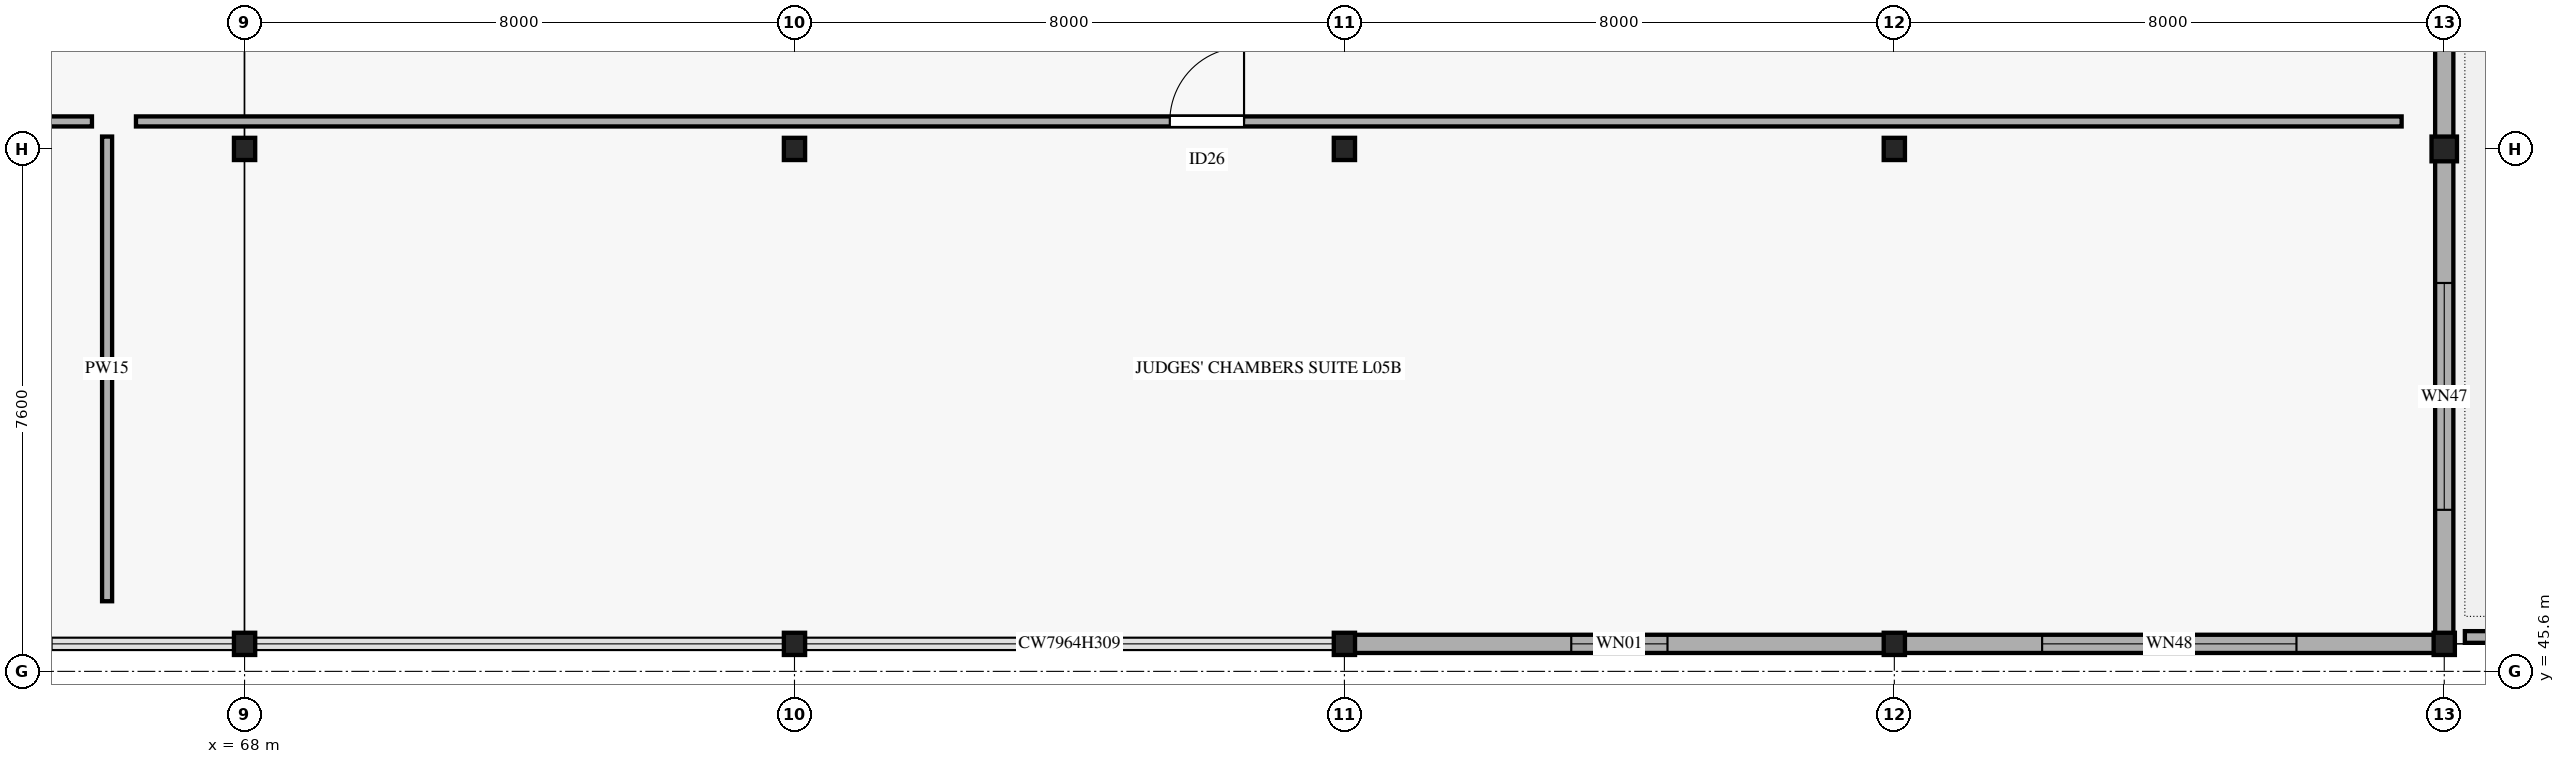
"""IFC4 building model, lengths in metres.
Left out: names, types, materials, properties, quantities, classifications, styles, units other than length and angle.
Written with IfcOpenShell. Run it as: python <this file> out.ifc"""

import sys

from ifc_helpers import new_model, si_unit, direction, frame, frame_2d, origin, origin_2d, place, context, subcontext, project, spatial, rectangle, i_section, extrude, element, fill, save


model = new_model("IFC4")
c1 = context("Model", 3, precision=1e-05, world=origin(), true_north=direction((0.0, 1.0)))
c2 = subcontext(c1, "Body", "Model", "MODEL_VIEW")
j1 = project(units=[si_unit("LENGTHUNIT", "METRE"), si_unit("PLANEANGLEUNIT", "RADIAN")], contexts=[c1])
p1 = place(None, origin())
s1 = spatial("IfcSite", under=j1, at=p1, CompositionType="ELEMENT")
p2 = place(p1, origin())
s2 = spatial("IfcBuilding", under=s1, at=p2, CompositionType="ELEMENT")
p3 = place(p2, frame((0.0, 0.0, 25.2)))
s3 = spatial("IfcBuildingStorey", under=s2, at=p3, CompositionType="ELEMENT", Elevation=25.2)
for number, where, z_axis, x_axis in (
    (1, (68.0, 46.0, 0.0), (0.0, 0.0, 1.0), (1.0, 0.0, 0.0)),
    (2, (68.0, 53.2, 0.0), (0.0, 0.0, 1.0), (1.0, 0.0, 0.0)),
    (3, (76.0, 46.0, 0.0), (0.0, 0.0, 1.0), (1.0, 0.0, 0.0)),
    (4, (76.0, 53.2, 0.0), (0.0, 0.0, 1.0), (1.0, 0.0, 0.0)),
    (5, (84.0, 46.0, 0.0), (0.0, 0.0, 1.0), (1.0, 0.0, 0.0)),
    (6, (84.0, 53.2, 0.0), (0.0, 0.0, 1.0), (1.0, 0.0, 0.0)),
    (7, (92.0, 46.0, 0.0), (0.0, 0.0, 1.0), (1.0, 0.0, 0.0)),
    (8, (92.0, 53.2, 0.0), (0.0, 0.0, 1.0), (1.0, 0.0, 0.0)),
    (9, (100.0, 46.0, 0.0), (0.0, 0.0, 1.0), (1.0, 0.0, 0.0)),
):
    element("IfcColumn", number, at=place(p3, frame(where, z_axis=z_axis, x_axis=x_axis)), inside=s3, PredefinedType="COLUMN", context=c2, shape_type="SweptSolid", body=[
        extrude(i_section(OverallWidth=0.309, OverallDepth=0.323, WebThickness=0.014, FlangeThickness=0.023, FilletRadius=0.015, at=origin_2d()), origin(), (0.0, 0.0, 1.0), 3.995),
    ])
p4 = place(p3, frame((100.0, 53.2, 0.0), z_axis=(0.0, 0.0, 1.0), x_axis=(1.0, 0.0, 0.0)))
e10 = element("IfcColumn", 10, at=p4, inside=s3, PredefinedType="COLUMN", context=c2, shape_type="SweptSolid", body=[
    extrude(i_section(OverallWidth=0.37, OverallDepth=0.36, WebThickness=0.012, FlangeThickness=0.02, FilletRadius=0.015, at=origin_2d()), origin(), (0.0, 0.0, 1.0), 3.995),
])
p5 = place(p3, frame((100.0, 60.82, 0.0), z_axis=(0.0, 0.0, 1.0), x_axis=(0.0, -1.0, 0.0)))
e11 = element("IfcWall", 11, at=p5, inside=s3, PredefinedType="STANDARD", context=c2, shape_type="SweptSolid", body=[
    extrude(rectangle(XDim=7.64, YDim=0.265, at=frame_2d((3.82, 0.0))), origin(), (0.0, 0.0, 1.0), 3.06),
])
p6 = place(p5, frame((2.37, 0.0, 0.75)))
e12 = element("IfcOpeningElement", 12, at=p6, cuts=e11, PredefinedType="OPENING", context=c2, shape_type="SweptSolid", body=[
    extrude(rectangle(XDim=2.9, YDim=1.65, at=frame_2d((1.45, 0.825))), frame((0.0, 0.142, 0.0), z_axis=(0.0, -1.0, 0.0), x_axis=(1.0, 0.0, 0.0)), (0.0, 0.0, 1.0), 0.285),
])
p7 = place(p3, frame((100.0, 53.22, 0.0), z_axis=(0.0, 0.0, 1.0), x_axis=(0.0, -1.0, 0.0)))
e13 = element("IfcWall", 13, at=p7, inside=s3, PredefinedType="STANDARD", context=c2, shape_type="SweptSolid", body=[
    extrude(rectangle(XDim=7.24, YDim=0.265, at=frame_2d((3.62, 0.0))), origin(), (0.0, 0.0, 1.0), 3.06),
])
p8 = place(p7, frame((1.97, 0.0, 0.75)))
e14 = element("IfcOpeningElement", 14, at=p8, cuts=e13, PredefinedType="OPENING", context=c2, shape_type="SweptSolid", body=[
    extrude(rectangle(XDim=3.3, YDim=1.65, at=frame_2d((1.65, 0.825))), frame((0.0, 0.142, 0.0), z_axis=(0.0, -1.0, 0.0), x_axis=(1.0, 0.0, 0.0)), (0.0, 0.0, 1.0), 0.285),
])
p9 = place(p3, frame((100.02, 46.0, 0.0), z_axis=(0.0, 0.0, 1.0), x_axis=(-1.0, 0.0, 0.0)))
e15 = element("IfcWall", 15, at=p9, inside=s3, PredefinedType="STANDARD", context=c2, shape_type="SweptSolid", body=[
    extrude(rectangle(XDim=8.04, YDim=0.265, at=frame_2d((4.02, 0.0))), origin(), (0.0, 0.0, 1.0), 3.06),
])
p10 = place(p9, frame((2.17, 0.0, 0.75)))
e16 = element("IfcOpeningElement", 16, at=p10, cuts=e15, PredefinedType="OPENING", context=c2, shape_type="SweptSolid", body=[
    extrude(rectangle(XDim=3.7, YDim=1.65, at=frame_2d((1.85, 0.825))), frame((0.0, 0.142, 0.0), z_axis=(0.0, -1.0, 0.0), x_axis=(1.0, 0.0, 0.0)), (0.0, 0.0, 1.0), 0.285),
])
p11 = place(p3, frame((92.02, 46.0, 0.0), z_axis=(0.0, 0.0, 1.0), x_axis=(-1.0, 0.0, 0.0)))
e17 = element("IfcWall", 17, at=p11, inside=s3, PredefinedType="STANDARD", context=c2, shape_type="SweptSolid", body=[
    extrude(rectangle(XDim=8.04, YDim=0.265, at=frame_2d((4.02, 0.0))), origin(), (0.0, 0.0, 1.0), 3.06),
])
p12 = place(p11, frame((3.32, 0.0, 0.75)))
e18 = element("IfcOpeningElement", 18, at=p12, cuts=e17, PredefinedType="OPENING", context=c2, shape_type="SweptSolid", body=[
    extrude(rectangle(XDim=1.4, YDim=2.0, at=frame_2d((0.7, 1.0))), frame((0.0, 0.142, 0.0), z_axis=(0.0, -1.0, 0.0), x_axis=(1.0, 0.0, 0.0)), (0.0, 0.0, 1.0), 0.285),
])
p13 = place(p3, frame((100.3, 46.1, 0.0), z_axis=(0.0, 0.0, 1.0), x_axis=(1.0, 0.0, 0.0)))
e19 = element("IfcWall", 19, at=p13, inside=s3, PredefinedType="PARAPET", context=c2, shape_type="SweptSolid", body=[
    extrude(rectangle(XDim=7.6, YDim=0.17, at=frame_2d((3.8, 0.0))), origin(), (0.0, 0.0, 1.0), 1.2),
])
p14 = place(p3, frame((31.82, 53.6, 0.0), z_axis=(0.0, 0.0, 1.0), x_axis=(1.0, 0.0, 0.0)))
e20 = element("IfcWall", 20, at=p14, inside=s3, PredefinedType="PARTITIONING", context=c2, shape_type="SweptSolid", body=[
    extrude(rectangle(XDim=33.96, YDim=0.146, at=frame_2d((16.98, 0.0))), origin(), (0.0, 0.0, 1.0), 2.85),
])
p15 = place(p14, frame((16.13, 0.0, 0.0)))
e21 = element("IfcOpeningElement", 21, at=p15, cuts=e20, PredefinedType="OPENING", context=c2, shape_type="SweptSolid", body=[
    extrude(rectangle(XDim=1.7, YDim=2.3, at=frame_2d((0.85, 1.15))), frame((0.0, 0.083, 0.0), z_axis=(0.0, -1.0, 0.0), x_axis=(1.0, 0.0, 0.0)), (0.0, 0.0, 1.0), 0.166),
])
p16 = place(p3, frame((66.0, 46.62, 0.0), z_axis=(0.0, 0.0, 1.0), x_axis=(0.0, 1.0, 0.0)))
e22 = element("IfcWall", 22, at=p16, inside=s3, PredefinedType="PARTITIONING", context=c2, shape_type="SweptSolid", body=[
    extrude(rectangle(XDim=6.76, YDim=0.146, at=frame_2d((3.38, 0.0))), origin(), (0.0, 0.0, 1.0), 2.85),
])
p17 = place(p3, frame((66.42, 53.6, 0.0), z_axis=(0.0, 0.0, 1.0), x_axis=(1.0, 0.0, 0.0)))
e23 = element("IfcWall", 23, at=p17, inside=s3, PredefinedType="PARTITIONING", context=c2, shape_type="SweptSolid", body=[
    extrude(rectangle(XDim=32.96, YDim=0.146, at=frame_2d((16.48, 0.0))), origin(), (0.0, 0.0, 1.0), 2.85),
])
p18 = place(p17, frame((15.04, 0.0, 0.0)))
e24 = element("IfcOpeningElement", 24, at=p18, cuts=e23, PredefinedType="OPENING", context=c2, shape_type="SweptSolid", body=[
    extrude(rectangle(XDim=1.08, YDim=2.25, at=frame_2d((0.54, 1.125))), frame((0.0, 0.083, 0.0), z_axis=(0.0, -1.0, 0.0), x_axis=(1.0, 0.0, 0.0)), (0.0, 0.0, 1.0), 0.166),
])
p19 = place(p8, origin())
e25 = element("IfcWindow", 25, at=p19, inside=s3, PartitioningType="SINGLE_PANEL", PredefinedType="WINDOW", context=c2, shape_type="SweptSolid", body=[
    extrude(rectangle(XDim=3.3, YDim=1.65, at=frame_2d((1.65, 0.825))), frame((0.0, 0.03, 0.0), z_axis=(0.0, -1.0, 0.0), x_axis=(1.0, 0.0, 0.0)), (0.0, 0.0, 1.0), 0.06),
])
fill(e14, e25)
p20 = place(p10, origin())
e26 = element("IfcWindow", 26, at=p20, inside=s3, PartitioningType="SINGLE_PANEL", PredefinedType="WINDOW", context=c2, shape_type="SweptSolid", body=[
    extrude(rectangle(XDim=3.7, YDim=1.65, at=frame_2d((1.85, 0.825))), frame((0.0, 0.03, 0.0), z_axis=(0.0, -1.0, 0.0), x_axis=(1.0, 0.0, 0.0)), (0.0, 0.0, 1.0), 0.06),
])
fill(e16, e26)
p21 = place(p12, origin())
e27 = element("IfcWindow", 27, at=p21, inside=s3, PartitioningType="SINGLE_PANEL", PredefinedType="WINDOW", context=c2, shape_type="SweptSolid", body=[
    extrude(rectangle(XDim=1.4, YDim=2.0, at=frame_2d((0.7, 1.0))), frame((0.0, 0.03, 0.0), z_axis=(0.0, -1.0, 0.0), x_axis=(1.0, 0.0, 0.0)), (0.0, 0.0, 1.0), 0.06),
])
fill(e18, e27)
p22 = place(p18, origin())
e28 = element("IfcDoor", 28, at=p22, inside=s3, OperationType="SINGLE_SWING_RIGHT", PredefinedType="DOOR", context=c2, shape_type="SweptSolid", body=[
    extrude(rectangle(XDim=1.08, YDim=2.25, at=frame_2d((0.54, 1.125))), frame((0.0, 0.025, 0.0), z_axis=(0.0, -1.0, 0.0), x_axis=(1.0, 0.0, 0.0)), (0.0, 0.0, 1.0), 0.05),
])
fill(e24, e28)
save(model, sys.argv[1])
